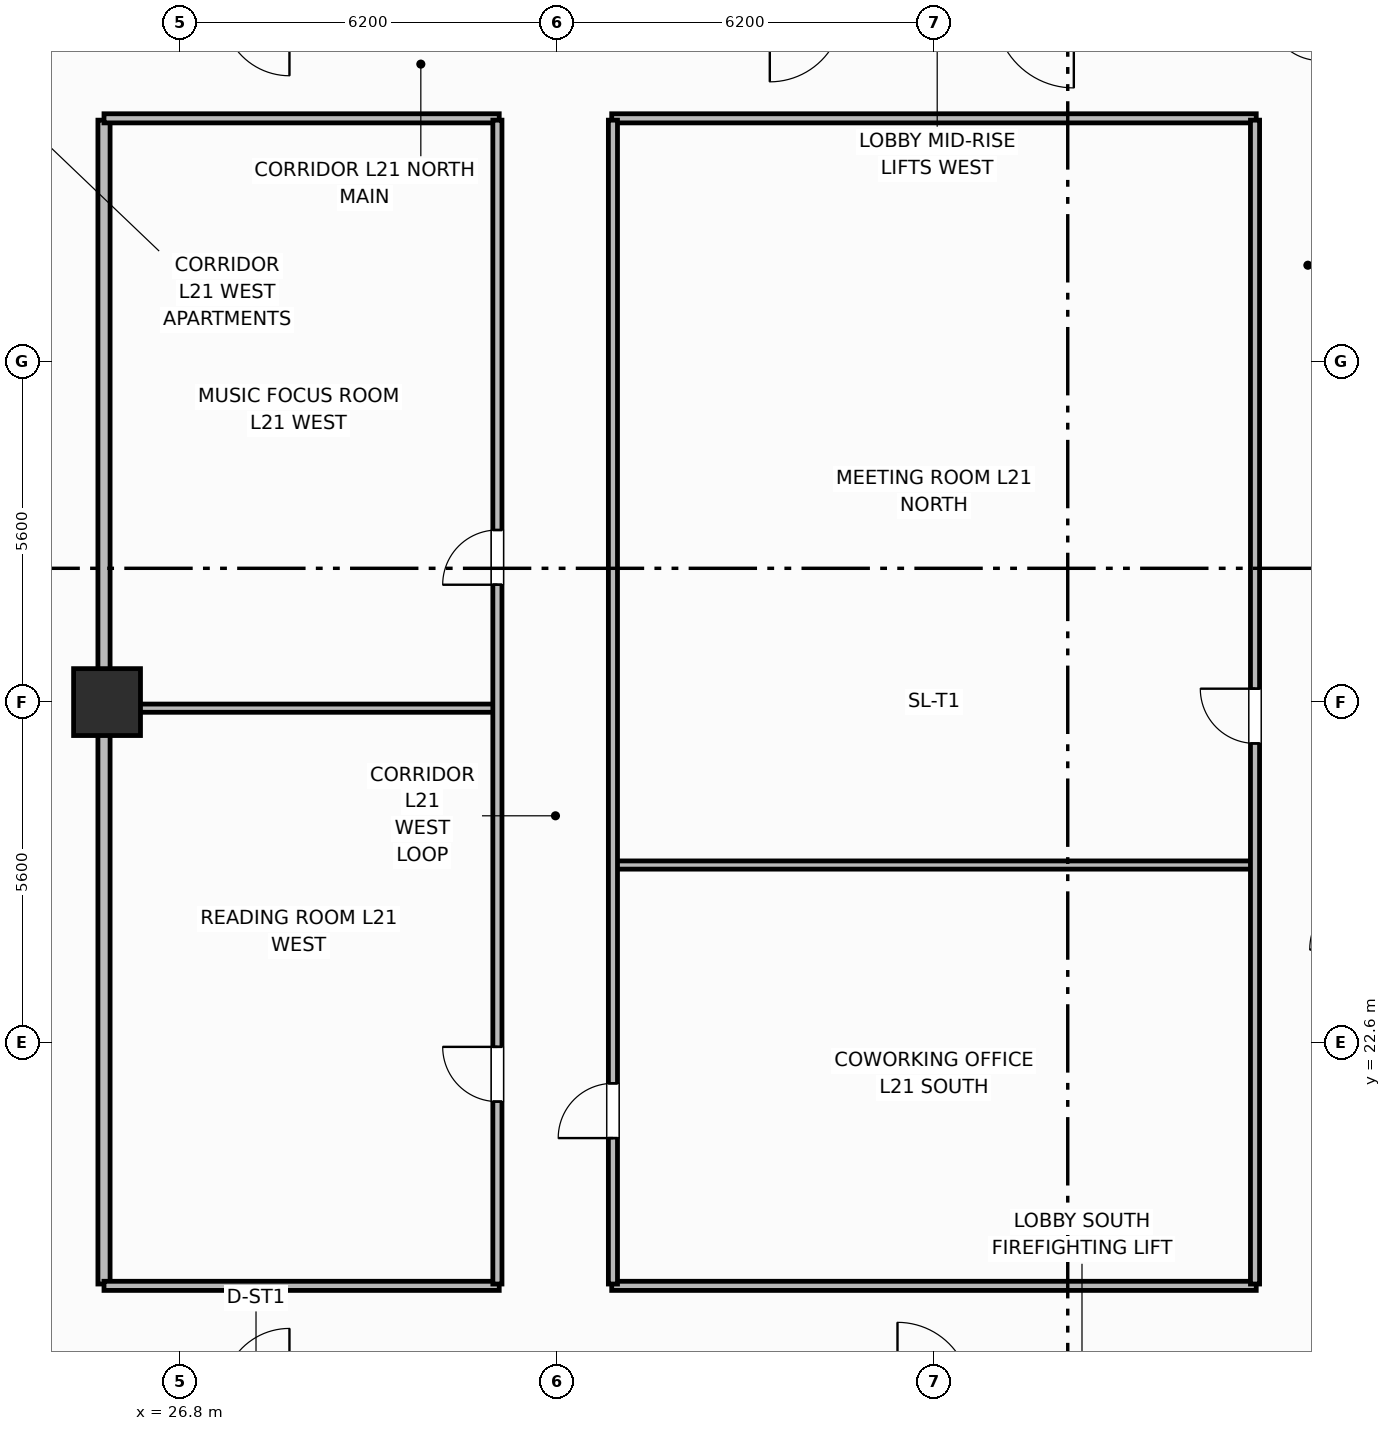
"""IFC4 building model, lengths in metres.
Left out: names, types, materials, properties, quantities, classifications, styles, units other than length and angle.
Written with IfcOpenShell. Run it as: python <this file> out.ifc"""

import sys

from ifc_helpers import new_model, si_unit, direction, frame, frame_2d, origin, origin_2d, place, context, subcontext, project, spatial, rectangle, extrude, element, fill, save


model = new_model("IFC4")
c1 = context("Model", 3, precision=1e-05, world=origin(), true_north=direction((0.0, 1.0)))
c2 = subcontext(c1, "Body", "Model", "MODEL_VIEW")
j1 = project(units=[si_unit("LENGTHUNIT", "METRE"), si_unit("PLANEANGLEUNIT", "RADIAN")], contexts=[c1])
p1 = place(None, origin())
s1 = spatial("IfcSite", under=j1, at=p1, CompositionType="ELEMENT")
p2 = place(p1, origin())
s2 = spatial("IfcBuilding", under=s1, at=p2, CompositionType="ELEMENT")
p3 = place(p2, frame((0.0, 0.0, 88.3)))
s3 = spatial("IfcBuildingStorey", under=s2, at=p3, CompositionType="ELEMENT", Elevation=88.3)
p4 = place(p3, frame((25.6, 28.2, 0.0), z_axis=(0.0, 0.0, 1.0), x_axis=(1.0, 0.0, 0.0)))
e1 = element("IfcColumn", 1, at=p4, inside=s3, PredefinedType="COLUMN", context=c2, shape_type="SweptSolid", body=[
    extrude(rectangle(XDim=1.1, YDim=1.1, at=origin_2d()), origin(), (0.0, 0.0, 1.0), 3.7),
])
p5 = place(p3, frame((25.55, 18.63, 0.0), z_axis=(0.0, 0.0, 1.0), x_axis=(0.0, 1.0, 0.0)))
e2 = element("IfcWall", 2, at=p5, inside=s3, PredefinedType="PARTITIONING", context=c2, shape_type="SweptSolid", body=[
    extrude(rectangle(XDim=19.14, YDim=0.2, at=frame_2d((9.57, 0.0))), origin(), (0.0, 0.0, 1.0), 2.53),
])
for number, where, z_axis, x_axis in (
    (3, (25.55, 18.6, 0.0), (0.0, 0.0, 1.0), (1.0, 0.0, 0.0)),
    (4, (25.55, 37.8, 0.0), (0.0, 0.0, 1.0), (1.0, 0.0, 0.0)),
):
    element("IfcWall", number, at=place(p3, frame(where, z_axis=z_axis, x_axis=x_axis)), inside=s3, PredefinedType="PARTITIONING", context=c2, shape_type="SweptSolid", body=[
        extrude(rectangle(XDim=6.5, YDim=0.15, at=frame_2d((3.25, 0.0))), origin(), (0.0, 0.0, 1.0), 2.53),
    ])
for number, where, z_axis, x_axis in (
    (5, (33.9, 18.6, 0.0), (0.0, 0.0, 1.0), (1.0, 0.0, 0.0)),
    (6, (33.9, 37.8, 0.0), (0.0, 0.0, 1.0), (1.0, 0.0, 0.0)),
):
    element("IfcWall", number, at=place(p3, frame(where, z_axis=z_axis, x_axis=x_axis)), inside=s3, PredefinedType="PARTITIONING", context=c2, shape_type="SweptSolid", body=[
        extrude(rectangle(XDim=10.6, YDim=0.15, at=frame_2d((5.3, 0.0))), origin(), (0.0, 0.0, 1.0), 2.53),
    ])
p6 = place(p3, frame((25.6, 28.1, 0.0), z_axis=(0.0, 0.0, 1.0), x_axis=(1.0, 0.0, 0.0)))
e7 = element("IfcWall", 7, at=p6, inside=s3, PredefinedType="PARTITIONING", context=c2, shape_type="SweptSolid", body=[
    extrude(rectangle(XDim=6.42, YDim=0.135, at=frame_2d((3.21, 0.0))), origin(), (0.0, 0.0, 1.0), 2.53),
])
p7 = place(p3, frame((33.92, 25.521, 0.0), z_axis=(0.0, 0.0, 1.0), x_axis=(1.0, 0.0, 0.0)))
e8 = element("IfcWall", 8, at=p7, inside=s3, PredefinedType="PARTITIONING", context=c2, shape_type="SweptSolid", body=[
    extrude(rectangle(XDim=10.56, YDim=0.135, at=frame_2d((5.28, 0.0))), origin(), (0.0, 0.0, 1.0), 2.53),
])
p8 = place(p3, frame((32.02, 18.63, 0.0), z_axis=(0.0, 0.0, 1.0), x_axis=(0.0, 1.0, 0.0)))
e9 = element("IfcWall", 9, at=p8, inside=s3, PredefinedType="PARTITIONING", context=c2, shape_type="SweptSolid", body=[
    extrude(rectangle(XDim=19.14, YDim=0.15, at=frame_2d((9.57, 0.0))), origin(), (0.0, 0.0, 1.0), 2.53),
])
p9 = place(p8, frame((3.0, 0.0, 0.0)))
e10 = element("IfcOpeningElement", 10, at=p9, cuts=e9, PredefinedType="OPENING", context=c2, shape_type="SweptSolid", body=[
    extrude(rectangle(XDim=0.9, YDim=2.1, at=frame_2d((0.45, 1.05))), frame((0.0, 0.085, 0.0), z_axis=(0.0, -1.0, 0.0), x_axis=(1.0, 0.0, 0.0)), (0.0, 0.0, 1.0), 0.17),
])
p10 = place(p8, frame((11.5, 0.0, 0.0)))
e11 = element("IfcOpeningElement", 11, at=p10, cuts=e9, PredefinedType="OPENING", context=c2, shape_type="SweptSolid", body=[
    extrude(rectangle(XDim=0.9, YDim=2.1, at=frame_2d((0.45, 1.05))), frame((0.0, 0.085, 0.0), z_axis=(0.0, -1.0, 0.0), x_axis=(1.0, 0.0, 0.0)), (0.0, 0.0, 1.0), 0.17),
])
p11 = place(p3, frame((33.92, 18.63, 0.0), z_axis=(0.0, 0.0, 1.0), x_axis=(0.0, 1.0, 0.0)))
e12 = element("IfcWall", 12, at=p11, inside=s3, PredefinedType="PARTITIONING", context=c2, shape_type="SweptSolid", body=[
    extrude(rectangle(XDim=19.14, YDim=0.15, at=frame_2d((9.57, 0.0))), origin(), (0.0, 0.0, 1.0), 2.53),
])
p12 = place(p11, frame((2.4, 0.0, 0.0)))
e13 = element("IfcOpeningElement", 13, at=p12, cuts=e12, PredefinedType="OPENING", context=c2, shape_type="SweptSolid", body=[
    extrude(rectangle(XDim=0.9, YDim=2.1, at=frame_2d((0.45, 1.05))), frame((0.0, 0.085, 0.0), z_axis=(0.0, -1.0, 0.0), x_axis=(1.0, 0.0, 0.0)), (0.0, 0.0, 1.0), 0.17),
])
p13 = place(p3, frame((44.48, 18.63, 0.0), z_axis=(0.0, 0.0, 1.0), x_axis=(0.0, 1.0, 0.0)))
e14 = element("IfcWall", 14, at=p13, inside=s3, PredefinedType="PARTITIONING", context=c2, shape_type="SweptSolid", body=[
    extrude(rectangle(XDim=19.14, YDim=0.15, at=frame_2d((9.57, 0.0))), origin(), (0.0, 0.0, 1.0), 2.53),
])
p14 = place(p13, frame((8.89, 0.0, 0.0)))
e15 = element("IfcOpeningElement", 15, at=p14, cuts=e14, PredefinedType="OPENING", context=c2, shape_type="SweptSolid", body=[
    extrude(rectangle(XDim=0.9, YDim=2.1, at=frame_2d((0.45, 1.05))), frame((0.0, 0.085, 0.0), z_axis=(0.0, -1.0, 0.0), x_axis=(1.0, 0.0, 0.0)), (0.0, 0.0, 1.0), 0.17),
])
p15 = place(p9, origin())
e16 = element("IfcDoor", 16, at=p15, inside=s3, OperationType="SINGLE_SWING_RIGHT", PredefinedType="DOOR", context=c2, shape_type="SweptSolid", body=[
    extrude(rectangle(XDim=0.9, YDim=2.1, at=frame_2d((0.45, 1.05))), frame((0.0, 0.025, 0.0), z_axis=(0.0, -1.0, 0.0), x_axis=(1.0, 0.0, 0.0)), (0.0, 0.0, 1.0), 0.05),
])
fill(e10, e16)
p16 = place(p10, origin())
e17 = element("IfcDoor", 17, at=p16, inside=s3, OperationType="SINGLE_SWING_LEFT", PredefinedType="DOOR", context=c2, shape_type="SweptSolid", body=[
    extrude(rectangle(XDim=0.9, YDim=2.1, at=frame_2d((0.45, 1.05))), frame((0.0, 0.025, 0.0), z_axis=(0.0, -1.0, 0.0), x_axis=(1.0, 0.0, 0.0)), (0.0, 0.0, 1.0), 0.05),
])
fill(e11, e17)
p17 = place(p12, origin())
e18 = element("IfcDoor", 18, at=p17, inside=s3, OperationType="SINGLE_SWING_LEFT", PredefinedType="DOOR", context=c2, shape_type="SweptSolid", body=[
    extrude(rectangle(XDim=0.9, YDim=2.1, at=frame_2d((0.45, 1.05))), frame((0.0, 0.025, 0.0), z_axis=(0.0, -1.0, 0.0), x_axis=(1.0, 0.0, 0.0)), (0.0, 0.0, 1.0), 0.05),
])
fill(e13, e18)
p18 = place(p14, origin())
e19 = element("IfcDoor", 19, at=p18, inside=s3, OperationType="SINGLE_SWING_RIGHT", PredefinedType="DOOR", context=c2, shape_type="SweptSolid", body=[
    extrude(rectangle(XDim=0.9, YDim=2.1, at=frame_2d((0.45, 1.05))), frame((0.0, 0.025, 0.0), z_axis=(0.0, -1.0, 0.0), x_axis=(1.0, 0.0, 0.0)), (0.0, 0.0, 1.0), 0.05),
])
fill(e15, e19)
save(model, sys.argv[1])
